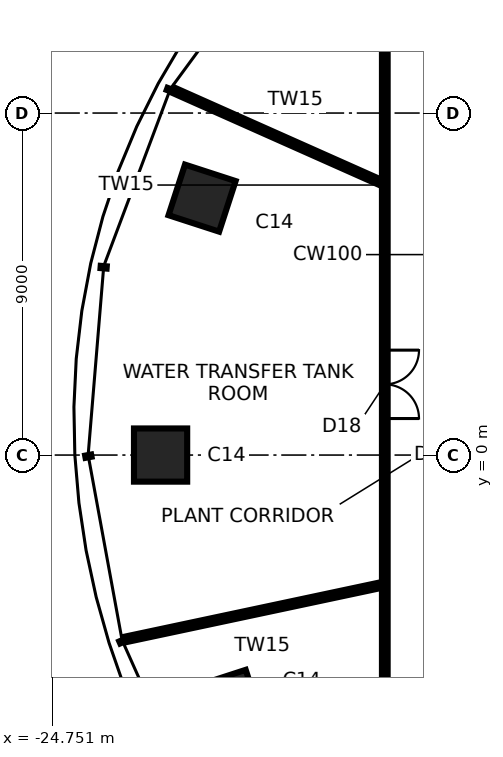
"""IFC4 building model, lengths in metres.
Left out: names, types, materials, properties, quantities, classifications, styles, units other than length and angle.
Written with IfcOpenShell. Run it as: python <this file> out.ifc"""

import sys

from ifc_helpers import new_model, si_unit, direction, frame, frame_2d, origin, origin_2d, place, context, subcontext, project, spatial, rectangle, extrude, element, fill, save


model = new_model("IFC4")
c1 = context("Model", 3, precision=1e-05, world=origin(), true_north=direction((0.0, 1.0)))
c2 = subcontext(c1, "Body", "Model", "MODEL_VIEW")
j1 = project(units=[si_unit("LENGTHUNIT", "METRE"), si_unit("PLANEANGLEUNIT", "RADIAN")], contexts=[c1])
p1 = place(None, origin())
s1 = spatial("IfcSite", under=j1, at=p1, CompositionType="ELEMENT")
p2 = place(p1, origin())
s2 = spatial("IfcBuilding", under=s1, at=p2, CompositionType="ELEMENT")
p3 = place(p2, frame((0.0, 0.0, 246.2)))
s3 = spatial("IfcBuildingStorey", under=s2, at=p3, CompositionType="ELEMENT", Elevation=246.2)
for number, where, z_axis, x_axis in (
    (1, (-20.808, 6.761, 0.0), (0.0, 0.0, 1.0), (-0.951, 0.309, 0.0)),
    (2, (-21.9, 0.0, 0.0), (0.0, 0.0, 1.0), (-1.0, 0.0, 0.0)),
    (3, (-20.109, -6.534, 0.0), (0.0, 0.0, 1.0), (-0.951, -0.309, 0.0)),
):
    element("IfcColumn", number, at=place(p3, frame(where, z_axis=z_axis, x_axis=x_axis)), inside=s3, PredefinedType="COLUMN", context=c2, shape_type="SweptSolid", body=[
        extrude(rectangle(XDim=1.4, YDim=1.4, at=origin_2d()), origin(), (0.0, 0.0, 1.0), 5.6),
    ])
p4 = place(p3, frame((-16.0, -3.401, 0.0), z_axis=(0.0, 0.0, 1.0), x_axis=(-0.978145707098, -0.207920599476, 0.0)))
e4 = element("IfcWall", 4, at=p4, inside=s3, PredefinedType="PARTITIONING", context=c2, shape_type="SweptSolid", body=[
    extrude(rectangle(XDim=6.988, YDim=0.15, at=frame_2d((3.494, 0.0))), origin(), (0.0, 0.0, 1.0), 5.4),
])
p5 = place(p3, frame((-16.0, 7.124, 0.0), z_axis=(0.0, 0.0, 1.0), x_axis=(-0.913547117463, 0.406732915039, 0.0)))
e5 = element("IfcWall", 5, at=p5, inside=s3, PredefinedType="PARTITIONING", context=c2, shape_type="SweptSolid", body=[
    extrude(rectangle(XDim=6.096, YDim=0.15, at=frame_2d((3.048, 0.0))), origin(), (0.0, 0.0, 1.0), 5.4),
])
p6 = place(p3, frame((-16.0, 11.3, 0.0), z_axis=(0.0, 0.0, 1.0), x_axis=(0.0, -1.0, 0.0)))
e6 = element("IfcWall", 6, at=p6, inside=s3, PredefinedType="PARTITIONING", context=c2, shape_type="SweptSolid", body=[
    extrude(rectangle(XDim=22.6, YDim=0.15, at=frame_2d((11.3, 0.0))), origin(), (0.0, 0.0, 1.0), 5.4),
])
p7 = place(p6, frame((8.539, 0.0, 0.0)))
e7 = element("IfcOpeningElement", 7, at=p7, cuts=e6, PredefinedType="OPENING", context=c2, shape_type="SweptSolid", body=[
    extrude(rectangle(XDim=1.8, YDim=2.4, at=frame_2d((0.9, 1.2))), frame((0.0, 0.085, 0.0), z_axis=(0.0, -1.0, 0.0), x_axis=(1.0, 0.0, 0.0)), (0.0, 0.0, 1.0), 0.17),
])
p8 = place(p6, frame((17.725, 0.0, 0.0)))
e8 = element("IfcOpeningElement", 8, at=p8, cuts=e6, PredefinedType="OPENING", context=c2, shape_type="SweptSolid", body=[
    extrude(rectangle(XDim=1.8, YDim=2.4, at=frame_2d((0.9, 1.2))), frame((0.0, 0.085, 0.0), z_axis=(0.0, -1.0, 0.0), x_axis=(1.0, 0.0, 0.0)), (0.0, 0.0, 1.0), 0.17),
])
p9 = place(p7, origin())
e9 = element("IfcDoor", 9, at=p9, inside=s3, OperationType="DOUBLE_DOOR_SINGLE_SWING", PredefinedType="DOOR", context=c2, shape_type="SweptSolid", body=[
    extrude(rectangle(XDim=1.8, YDim=2.4, at=frame_2d((0.9, 1.2))), frame((0.0, 0.025, 0.0), z_axis=(0.0, -1.0, 0.0), x_axis=(1.0, 0.0, 0.0)), (0.0, 0.0, 1.0), 0.05),
])
fill(e7, e9)
save(model, sys.argv[1])
